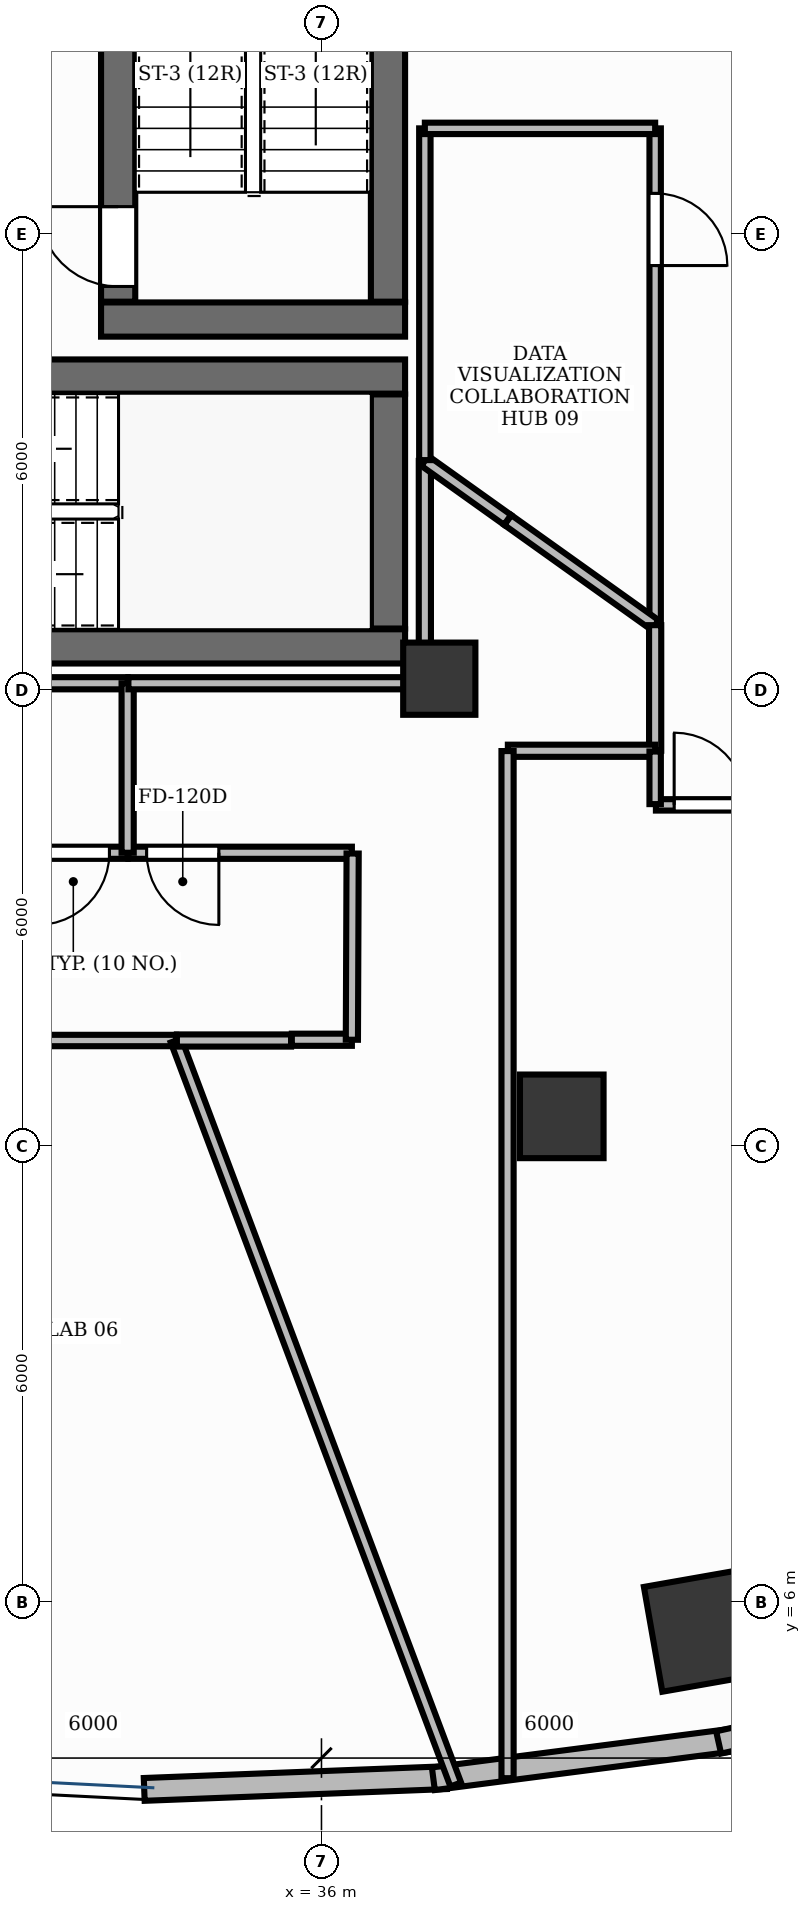
"""IFC4 building model, lengths in metres.
Left out: names, types, materials, properties, quantities, classifications, styles, units other than length and angle.
Written with IfcOpenShell. Run it as: python <this file> out.ifc"""

import sys

from ifc_helpers import new_model, si_unit, direction, frame, frame_2d, origin, origin_2d, place, context, subcontext, project, spatial, rectangle, extrude, element, fill, save


model = new_model("IFC4")
c1 = context("Model", 3, precision=1e-05, world=origin(), true_north=direction((0.0, 1.0)))
c2 = subcontext(c1, "Body", "Model", "MODEL_VIEW")
j1 = project(units=[si_unit("LENGTHUNIT", "METRE"), si_unit("PLANEANGLEUNIT", "RADIAN")], contexts=[c1])
p1 = place(None, origin())
s1 = spatial("IfcSite", under=j1, at=p1, CompositionType="ELEMENT")
p2 = place(p1, origin())
s2 = spatial("IfcBuilding", under=s1, at=p2, CompositionType="ELEMENT")
p3 = place(p2, frame((0.0, 0.0, 59.4)))
s3 = spatial("IfcBuildingStorey", under=s2, at=p3, CompositionType="ELEMENT", Elevation=59.4)
p4 = place(p3, frame((28.852, 18.575, 0.0), z_axis=(0.0, 0.0, 1.0), x_axis=(1.0, 0.0, 0.0)))
e1 = element("IfcWall", 1, at=p4, inside=s3, PredefinedType="SHEAR", context=c2, shape_type="SweptSolid", body=[
    extrude(rectangle(XDim=8.248, YDim=0.45, at=frame_2d((4.124, 0.0))), origin(), (0.0, 0.0, 1.0), 3.9),
])
p5 = place(p3, frame((28.35, 22.125, 0.0), z_axis=(0.0, 0.0, 1.0), x_axis=(1.0, 0.0, 0.0)))
e2 = element("IfcWall", 2, at=p5, inside=s3, PredefinedType="SHEAR", context=c2, shape_type="SweptSolid", body=[
    extrude(rectangle(XDim=8.75, YDim=0.45, at=frame_2d((4.375, 0.0))), origin(), (0.0, 0.0, 1.0), 3.9),
])
p6 = place(p3, frame((36.875, 18.81, 0.0), z_axis=(0.0, 0.0, 1.0), x_axis=(0.0, 1.0, 0.0)))
e3 = element("IfcWall", 3, at=p6, inside=s3, PredefinedType="SHEAR", context=c2, shape_type="SweptSolid", body=[
    extrude(rectangle(XDim=3.08, YDim=0.45, at=frame_2d((1.54, 0.0))), origin(), (0.0, 0.0, 1.0), 3.9),
])
p7 = place(p3, frame((33.1, 22.875, 0.0), z_axis=(0.0, 0.0, 1.0), x_axis=(1.0, 0.0, 0.0)))
e4 = element("IfcWall", 4, at=p7, inside=s3, PredefinedType="SHEAR", context=c2, shape_type="SweptSolid", body=[
    extrude(rectangle(XDim=4.0, YDim=0.45, at=frame_2d((2.0, 0.0))), origin(), (0.0, 0.0, 1.0), 3.9),
])
p8 = place(p3, frame((36.875, 23.11, 0.0), z_axis=(0.0, 0.0, 1.0), x_axis=(0.0, 1.0, 0.0)))
e5 = element("IfcWall", 5, at=p8, inside=s3, PredefinedType="SHEAR", context=c2, shape_type="SweptSolid", body=[
    extrude(rectangle(XDim=7.78, YDim=0.45, at=frame_2d((3.89, 0.0))), origin(), (0.0, 0.0, 1.0), 3.9),
])
p9 = place(p3, frame((33.325, 23.11, 0.0), z_axis=(0.0, 0.0, 1.0), x_axis=(0.0, 1.0, 0.0)))
e6 = element("IfcWall", 6, at=p9, inside=s3, PredefinedType="SHEAR", context=c2, shape_type="SweptSolid", body=[
    extrude(rectangle(XDim=7.78, YDim=0.45, at=frame_2d((3.89, 0.0))), origin(), (0.0, 0.0, 1.0), 3.9),
])
p10 = place(p9, frame((0.2, 0.0, 0.0)))
e7 = element("IfcOpeningElement", 7, at=p10, cuts=e6, PredefinedType="OPENING", context=c2, shape_type="SweptSolid", body=[
    extrude(rectangle(XDim=1.05, YDim=2.15, at=frame_2d((0.525, 1.075))), frame((0.0, 0.24, 0.0), z_axis=(0.0, -1.0, 0.0), x_axis=(1.0, 0.0, 0.0)), (0.0, 0.0, 1.0), 0.48),
])
p11 = place(p3, frame((37.55, 18.15, -0.0), z_axis=(0.0, 0.0, 1.0), x_axis=(1.0, 0.0, 0.0)))
e8 = element("IfcColumn", 8, at=p11, inside=s3, PredefinedType="PILASTER", context=c2, shape_type="SweptSolid", body=[
    extrude(rectangle(XDim=0.95, YDim=0.95, at=origin_2d()), origin(), (0.0, 0.0, 1.0), 3.901),
])
p12 = place(p3, frame((41.052, 5.633, -0.0), z_axis=(0.0, 0.0, 1.0), x_axis=(0.984868307662, 0.173304404339, 0.0)))
e9 = element("IfcColumn", 9, at=p12, inside=s3, PredefinedType="COLUMN", context=c2, shape_type="SweptSolid", body=[
    extrude(rectangle(XDim=1.4, YDim=1.4, at=origin_2d()), origin(), (0.0, 0.0, 1.0), 3.901),
])
p13 = place(p3, frame((39.161, 12.392, -0.0), z_axis=(0.0, 0.0, 1.0), x_axis=(1.0, 0.0, 0.0)))
e10 = element("IfcColumn", 10, at=p13, inside=s3, PredefinedType="COLUMN", context=c2, shape_type="SweptSolid", body=[
    extrude(rectangle(XDim=1.1, YDim=1.1, at=origin_2d()), origin(), (0.0, 0.0, 1.0), 3.901),
])
p14 = place(p3, frame((33.668, 3.538, 0.0), z_axis=(0.0, 0.0, 1.0), x_axis=(0.999245411623, 0.038840794937, 0.0)))
e11 = element("IfcWall", 11, at=p14, inside=s3, PredefinedType="STANDARD", context=c2, shape_type="SweptSolid", body=[
    extrude(rectangle(XDim=3.979, YDim=0.3, at=frame_2d((1.989, 0.0))), origin(), (0.0, 0.0, 1.0), 3.9),
])
p15 = place(p3, frame((37.472, 3.678, 0.0), z_axis=(0.0, 0.0, 1.0), x_axis=(0.991734095036, 0.128310111617, 0.0)))
e12 = element("IfcWall", 12, at=p15, inside=s3, PredefinedType="STANDARD", context=c2, shape_type="SweptSolid", body=[
    extrude(rectangle(XDim=3.956, YDim=0.3, at=frame_2d((1.978, 0.0))), origin(), (0.0, 0.0, 1.0), 3.9),
])
p16 = place(p3, frame((41.225, 4.155, 0.0), z_axis=(0.0, 0.0, 1.0), x_axis=(0.975868573345, 0.218358713032, 0.0)))
e13 = element("IfcWall", 13, at=p16, inside=s3, PredefinedType="STANDARD", context=c2, shape_type="SweptSolid", body=[
    extrude(rectangle(XDim=3.909, YDim=0.3, at=frame_2d((1.954, 0.0))), origin(), (0.0, 0.0, 1.0), 3.9),
])
p17 = place(p3, frame((33.45, 15.86, 0.0), z_axis=(0.0, 0.0, 1.0), x_axis=(-1.0, 0.0, 0.0)))
e14 = element("IfcWall", 14, at=p17, inside=s3, PredefinedType="PARTITIONING", context=c2, shape_type="SweptSolid", body=[
    extrude(rectangle(XDim=3.3, YDim=0.16, at=frame_2d((1.65, 0.0))), origin(), (0.0, 0.0, 1.0), 2.91),
])
p18 = place(p17, frame((0.24, 0.0, 0.0)))
e15 = element("IfcOpeningElement", 15, at=p18, cuts=e14, PredefinedType="OPENING", context=c2, shape_type="SweptSolid", body=[
    extrude(rectangle(XDim=0.95, YDim=2.15, at=frame_2d((0.475, 1.075))), frame((0.0, 0.095, 0.0), z_axis=(0.0, -1.0, 0.0), x_axis=(1.0, 0.0, 0.0)), (0.0, 0.0, 1.0), 0.19),
])
p19 = place(p3, frame((28.5, 13.39, 0.0), z_axis=(0.0, 0.0, 1.0), x_axis=(1.0, 0.0, 0.0)))
e16 = element("IfcWall", 16, at=p19, inside=s3, PredefinedType="PARTITIONING", context=c2, shape_type="SweptSolid", body=[
    extrude(rectangle(XDim=5.587, YDim=0.15, at=frame_2d((2.793, 0.0))), origin(), (0.0, 0.0, 1.0), 2.91),
])
p20 = place(p19, frame((0.24, 0.0, 0.0)))
e17 = element("IfcOpeningElement", 17, at=p20, cuts=e16, PredefinedType="OPENING", context=c2, shape_type="SweptSolid", body=[
    extrude(rectangle(XDim=0.95, YDim=2.15, at=frame_2d((0.475, 1.075))), frame((0.0, 0.09, 0.0), z_axis=(0.0, -1.0, 0.0), x_axis=(1.0, 0.0, 0.0)), (0.0, 0.0, 1.0), 0.18),
])
p21 = place(p3, frame((36.4, 15.86, 0.0), z_axis=(0.0, 0.0, 1.0), x_axis=(-1.0, 0.0, 0.0)))
e18 = element("IfcWall", 18, at=p21, inside=s3, PredefinedType="PARTITIONING", context=c2, shape_type="SweptSolid", body=[
    extrude(rectangle(XDim=2.94, YDim=0.16, at=frame_2d((1.47, 0.0))), origin(), (0.0, 0.0, 1.0), 2.91),
])
p22 = place(p21, frame((1.75, 0.0, 0.0)))
e19 = element("IfcOpeningElement", 19, at=p22, cuts=e18, PredefinedType="OPENING", context=c2, shape_type="SweptSolid", body=[
    extrude(rectangle(XDim=0.95, YDim=2.15, at=frame_2d((0.475, 1.075))), frame((0.0, 0.095, 0.0), z_axis=(0.0, -1.0, 0.0), x_axis=(1.0, 0.0, 0.0)), (0.0, 0.0, 1.0), 0.19),
])
p23 = place(p3, frame((40.4, 16.49, 0.0), z_axis=(0.0, 0.0, 1.0), x_axis=(1.0, 0.0, 0.0)))
e20 = element("IfcWall", 20, at=p23, inside=s3, PredefinedType="PARTITIONING", context=c2, shape_type="SweptSolid", body=[
    extrude(rectangle(XDim=3.8, YDim=0.15, at=frame_2d((1.9, 0.0))), origin(), (0.0, 0.0, 1.0), 2.91),
])
p24 = place(p23, frame((0.24, 0.0, 0.0)))
e21 = element("IfcOpeningElement", 21, at=p24, cuts=e20, PredefinedType="OPENING", context=c2, shape_type="SweptSolid", body=[
    extrude(rectangle(XDim=0.95, YDim=2.15, at=frame_2d((0.475, 1.075))), frame((0.0, 0.09, 0.0), z_axis=(0.0, -1.0, 0.0), x_axis=(1.0, 0.0, 0.0)), (0.0, 0.0, 1.0), 0.18),
])
p25 = place(p3, frame((40.39, 25.39, 0.0), z_axis=(0.0, 0.0, 1.0), x_axis=(0.0, -1.0, 0.0)))
e22 = element("IfcWall", 22, at=p25, inside=s3, PredefinedType="PARTITIONING", context=c2, shape_type="SweptSolid", body=[
    extrude(rectangle(XDim=6.523, YDim=0.15, at=frame_2d((3.262, 0.0))), origin(), (0.0, 0.0, 1.0), 2.91),
])
p26 = place(p25, frame((0.855, 0.0, 0.0)))
e23 = element("IfcOpeningElement", 23, at=p26, cuts=e22, PredefinedType="OPENING", context=c2, shape_type="SweptSolid", body=[
    extrude(rectangle(XDim=0.95, YDim=2.15, at=frame_2d((0.475, 1.075))), frame((0.0, 0.09, 0.0), z_axis=(0.0, -1.0, 0.0), x_axis=(1.0, 0.0, 0.0)), (0.0, 0.0, 1.0), 0.18),
])
p27 = place(p3, frame((30.15, 18.09, 0.0), z_axis=(0.0, 0.0, 1.0), x_axis=(1.0, 0.0, 0.0)))
e24 = element("IfcWall", 24, at=p27, inside=s3, PredefinedType="PARTITIONING", context=c2, shape_type="SweptSolid", body=[
    extrude(rectangle(XDim=3.3, YDim=0.16, at=frame_2d((1.65, 0.0))), origin(), (0.0, 0.0, 1.0), 2.91),
])
p28 = place(p3, frame((33.45, 18.09, 0.0), z_axis=(0.0, 0.0, 1.0), x_axis=(0.0, -1.0, 0.0)))
e25 = element("IfcWall", 25, at=p28, inside=s3, PredefinedType="PARTITIONING", context=c2, shape_type="SweptSolid", body=[
    extrude(rectangle(XDim=2.23, YDim=0.16, at=frame_2d((1.115, 0.0))), origin(), (0.0, 0.0, 1.0), 2.91),
])
p29 = place(p3, frame((34.087, 13.39, 0.0), z_axis=(0.0, 0.0, 1.0), x_axis=(0.351837225237, -0.936061198286, 0.0)))
e26 = element("IfcWall", 26, at=p29, inside=s3, PredefinedType="PARTITIONING", context=c2, shape_type="SweptSolid", body=[
    extrude(rectangle(XDim=10.456, YDim=0.15, at=frame_2d((5.228, 0.0))), origin(), (0.0, 0.0, 1.0), 2.91),
])
p30 = place(p3, frame((38.452, 20.237, 0.0), z_axis=(0.0, 0.0, 1.0), x_axis=(0.814086766517, -0.580743262192, 0.0)))
e27 = element("IfcWall", 27, at=p30, inside=s3, PredefinedType="PARTITIONING", context=c2, shape_type="SweptSolid", body=[
    extrude(rectangle(XDim=2.38, YDim=0.16, at=frame_2d((1.19, 0.0))), origin(), (0.0, 0.0, 1.0), 2.91),
])
p31 = place(p3, frame((40.39, 18.854, 0.0), z_axis=(0.0, 0.0, 1.0), x_axis=(0.0, -1.0, 0.0)))
e28 = element("IfcWall", 28, at=p31, inside=s3, PredefinedType="PARTITIONING", context=c2, shape_type="SweptSolid", body=[
    extrude(rectangle(XDim=1.652, YDim=0.16, at=frame_2d((0.826, 0.0))), origin(), (0.0, 0.0, 1.0), 2.91),
])
p32 = place(p3, frame((40.39, 17.202, 0.0), z_axis=(0.0, 0.0, 1.0), x_axis=(-1.0, 0.0, 0.0)))
e29 = element("IfcWall", 29, at=p32, inside=s3, PredefinedType="PARTITIONING", context=c2, shape_type="SweptSolid", body=[
    extrude(rectangle(XDim=1.938, YDim=0.16, at=frame_2d((0.969, 0.0))), origin(), (0.0, 0.0, 1.0), 2.91),
])
p33 = place(p3, frame((38.448, 17.198, 0.0), z_axis=(0.0, 0.0, 1.0), x_axis=(0.0, -1.0, 0.0)))
e30 = element("IfcWall", 30, at=p33, inside=s3, PredefinedType="PARTITIONING", context=c2, shape_type="SweptSolid", body=[
    extrude(rectangle(XDim=13.513, YDim=0.16, at=frame_2d((6.756, 0.0))), origin(), (0.0, 0.0, 1.0), 2.91),
])
p34 = place(p3, frame((34.098, 13.39, 0.0), z_axis=(0.0, 0.0, 1.0), x_axis=(1.0, 0.0, 0.0)))
e31 = element("IfcWall", 31, at=p34, inside=s3, PredefinedType="PARTITIONING", context=c2, shape_type="SweptSolid", body=[
    extrude(rectangle(XDim=1.502, YDim=0.16, at=frame_2d((0.751, 0.0))), origin(), (0.0, 0.0, 1.0), 2.91),
])
p35 = place(p3, frame((35.61, 13.4, 0.0), z_axis=(0.0, 0.0, 1.0), x_axis=(1.0, 0.0, 0.0)))
e32 = element("IfcWall", 32, at=p35, inside=s3, PredefinedType="PARTITIONING", context=c2, shape_type="SweptSolid", body=[
    extrude(rectangle(XDim=0.79, YDim=0.16, at=frame_2d((0.395, 0.0))), origin(), (0.0, 0.0, 1.0), 2.91),
])
p36 = place(p3, frame((36.4, 13.4, 0.0), z_axis=(0.0, 0.0, 1.0), x_axis=(0.004085258855, 0.999991655295, 0.0)))
e33 = element("IfcWall", 33, at=p36, inside=s3, PredefinedType="PARTITIONING", context=c2, shape_type="SweptSolid", body=[
    extrude(rectangle(XDim=2.45, YDim=0.16, at=frame_2d((1.225, 0.0))), origin(), (0.0, 0.0, 1.0), 2.91),
])
p37 = place(p3, frame((33.46, 18.09, 0.0), z_axis=(0.0, 0.0, 1.0), x_axis=(1.0, 0.0, 0.0)))
e34 = element("IfcWall", 34, at=p37, inside=s3, PredefinedType="PARTITIONING", context=c2, shape_type="SweptSolid", body=[
    extrude(rectangle(XDim=3.89, YDim=0.16, at=frame_2d((1.945, 0.0))), origin(), (0.0, 0.0, 1.0), 2.91),
])
p38 = place(p3, frame((37.36, 18.1, 0.0), z_axis=(0.0, 0.0, 1.0), x_axis=(0.0, 1.0, 0.0)))
e35 = element("IfcWall", 35, at=p38, inside=s3, PredefinedType="PARTITIONING", context=c2, shape_type="SweptSolid", body=[
    extrude(rectangle(XDim=2.916, YDim=0.16, at=frame_2d((1.458, 0.0))), origin(), (0.0, 0.0, 1.0), 2.91),
])
p39 = place(p3, frame((37.36, 21.016, 0.0), z_axis=(0.0, 0.0, 1.0), x_axis=(0.814066623235, -0.580771498039, 0.0)))
e36 = element("IfcWall", 36, at=p39, inside=s3, PredefinedType="PARTITIONING", context=c2, shape_type="SweptSolid", body=[
    extrude(rectangle(XDim=1.336, YDim=0.16, at=frame_2d((0.668, 0.0))), origin(), (0.0, 0.0, 1.0), 2.91),
])
p40 = place(p3, frame((40.39, 17.192, 0.0), z_axis=(0.0, 0.0, 1.0), x_axis=(0.0, -1.0, 0.0)))
e37 = element("IfcWall", 37, at=p40, inside=s3, PredefinedType="PARTITIONING", context=c2, shape_type="SweptSolid", body=[
    extrude(rectangle(XDim=0.692, YDim=0.15, at=frame_2d((0.346, 0.0))), origin(), (0.0, 0.0, 1.0), 2.91),
])
p41 = place(p3, frame((37.36, 21.026, 0.0), z_axis=(0.0, 0.0, 1.0), x_axis=(0.0, 1.0, 0.0)))
e38 = element("IfcWall", 38, at=p41, inside=s3, PredefinedType="PARTITIONING", context=c2, shape_type="SweptSolid", body=[
    extrude(rectangle(XDim=4.364, YDim=0.15, at=frame_2d((2.182, 0.0))), origin(), (0.0, 0.0, 1.0), 2.91),
])
p42 = place(p3, frame((37.36, 25.39, 0.0), z_axis=(0.0, 0.0, 1.0), x_axis=(1.0, 0.0, 0.0)))
e39 = element("IfcWall", 39, at=p42, inside=s3, PredefinedType="PARTITIONING", context=c2, shape_type="SweptSolid", body=[
    extrude(rectangle(XDim=3.03, YDim=0.15, at=frame_2d((1.515, 0.0))), origin(), (0.0, 0.0, 1.0), 2.91),
])
p43 = place(p10, origin())
e40 = element("IfcDoor", 40, at=p43, inside=s3, OperationType="SINGLE_SWING_RIGHT", PredefinedType="DOOR", context=c2, shape_type="SweptSolid", body=[
    extrude(rectangle(XDim=1.05, YDim=2.15, at=frame_2d((0.525, 1.075))), frame((0.0, 0.025, 0.0), z_axis=(0.0, -1.0, 0.0), x_axis=(1.0, 0.0, 0.0)), (0.0, 0.0, 1.0), 0.05),
])
fill(e7, e40)
p44 = place(p18, origin())
e41 = element("IfcDoor", 41, at=p44, inside=s3, OperationType="SINGLE_SWING_RIGHT", PredefinedType="DOOR", context=c2, shape_type="SweptSolid", body=[
    extrude(rectangle(XDim=0.95, YDim=2.15, at=frame_2d((0.475, 1.075))), frame((0.0, 0.025, 0.0), z_axis=(0.0, -1.0, 0.0), x_axis=(1.0, 0.0, 0.0)), (0.0, 0.0, 1.0), 0.05),
])
fill(e15, e41)
p45 = place(p22, origin())
e42 = element("IfcDoor", 42, at=p45, inside=s3, OperationType="SINGLE_SWING_LEFT", PredefinedType="DOOR", context=c2, shape_type="SweptSolid", body=[
    extrude(rectangle(XDim=0.95, YDim=2.15, at=frame_2d((0.475, 1.075))), frame((0.0, 0.025, 0.0), z_axis=(0.0, -1.0, 0.0), x_axis=(1.0, 0.0, 0.0)), (0.0, 0.0, 1.0), 0.05),
])
fill(e19, e42)
p46 = place(p24, origin())
e43 = element("IfcDoor", 43, at=p46, inside=s3, OperationType="SINGLE_SWING_LEFT", PredefinedType="DOOR", context=c2, shape_type="SweptSolid", body=[
    extrude(rectangle(XDim=0.95, YDim=2.15, at=frame_2d((0.475, 1.075))), frame((0.0, 0.025, 0.0), z_axis=(0.0, -1.0, 0.0), x_axis=(1.0, 0.0, 0.0)), (0.0, 0.0, 1.0), 0.05),
])
fill(e21, e43)
p47 = place(p26, origin())
e44 = element("IfcDoor", 44, at=p47, inside=s3, OperationType="SINGLE_SWING_RIGHT", PredefinedType="DOOR", context=c2, shape_type="SweptSolid", body=[
    extrude(rectangle(XDim=0.95, YDim=2.15, at=frame_2d((0.475, 1.075))), frame((0.0, 0.025, 0.0), z_axis=(0.0, -1.0, 0.0), x_axis=(1.0, 0.0, 0.0)), (0.0, 0.0, 1.0), 0.05),
])
fill(e23, e44)
save(model, sys.argv[1])
